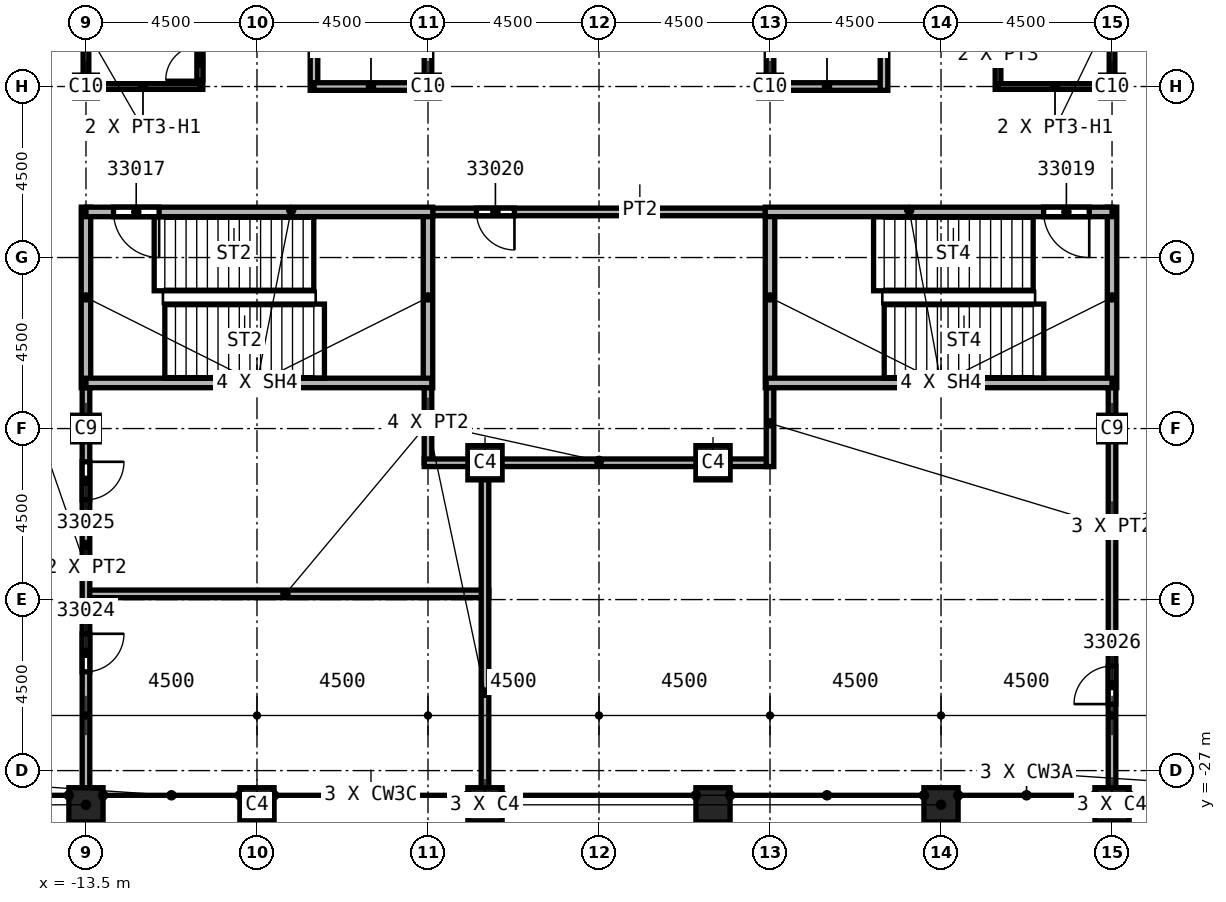
"""IFC4 building model, lengths in metres.
Left out: names, types, materials, properties, quantities, classifications, styles, units other than length and angle.
Written with IfcOpenShell. Run it as: python <this file> out.ifc"""

import sys

from ifc_helpers import new_model, si_unit, direction, frame, frame_2d, origin, origin_2d, place, context, subcontext, project, spatial, rectangle, extrude, element, fill, save


model = new_model("IFC4")
c1 = context("Model", 3, precision=1e-05, world=origin(), true_north=direction((0.0, 1.0)))
c2 = subcontext(c1, "Body", "Model", "MODEL_VIEW")
j1 = project(units=[si_unit("LENGTHUNIT", "METRE"), si_unit("PLANEANGLEUNIT", "RADIAN")], contexts=[c1])
p1 = place(None, origin())
s1 = spatial("IfcSite", under=j1, at=p1, CompositionType="ELEMENT")
p2 = place(p1, origin())
s2 = spatial("IfcBuilding", under=s1, at=p2, CompositionType="ELEMENT")
p3 = place(p2, frame((0.0, 0.0, 361.0)))
s3 = spatial("IfcBuildingStorey", under=s2, at=p3, CompositionType="ELEMENT", Elevation=361.0)
for number, where, z_axis, x_axis in (
    (1, (13.5, -18.0, 0.0), (0.0, 0.0, 1.0), (1.0, 0.0, 0.0)),
    (2, (-13.5, -18.0, 0.0), (0.0, 0.0, 1.0), (1.0, 0.0, 0.0)),
):
    element("IfcColumn", number, at=place(p3, frame(where, z_axis=z_axis, x_axis=x_axis)), inside=s3, PredefinedType="COLUMN", context=c2, shape_type="SweptSolid", body=[
        extrude(rectangle(XDim=0.7, YDim=0.7, at=origin_2d()), origin(), (0.0, 0.0, 1.0), 4.6),
    ])
for number, where, z_axis, x_axis in (
    (3, (4.5, -9.0, 0.0), (0.0, 0.0, 1.0), (1.0, 0.0, 0.0)),
    (4, (13.5, -9.0, 0.0), (0.0, 0.0, 1.0), (1.0, 0.0, 0.0)),
    (5, (-4.5, -9.0, 0.0), (0.0, 0.0, 1.0), (1.0, 0.0, 0.0)),
    (6, (-13.5, -9.0, 0.0), (0.0, 0.0, 1.0), (1.0, 0.0, 0.0)),
):
    element("IfcColumn", number, at=place(p3, frame(where, z_axis=z_axis, x_axis=x_axis)), inside=s3, PredefinedType="COLUMN", context=c2, shape_type="SweptSolid", body=[
        extrude(rectangle(XDim=0.6, YDim=0.6, at=origin_2d()), origin(), (0.0, 0.0, 1.0), 4.6),
    ])
for number, where, z_axis, x_axis in (
    (7, (3.0, -27.9, 0.0), (0.0, 0.0, 1.0), (1.0, 0.0, 0.0)),
    (8, (9.0, -27.9, 0.0), (0.0, 0.0, 1.0), (1.0, 0.0, 0.0)),
    (9, (13.5, -27.9, 0.0), (0.0, 0.0, 1.0), (1.0, 0.0, 0.0)),
    (10, (-3.0, -27.9, 0.0), (0.0, 0.0, 1.0), (1.0, 0.0, 0.0)),
    (11, (-9.0, -27.9, 0.0), (0.0, 0.0, 1.0), (1.0, 0.0, 0.0)),
    (12, (-13.5, -27.9, 0.0), (0.0, 0.0, 1.0), (1.0, 0.0, 0.0)),
    (13, (3.0, -18.9, 0.0), (0.0, 0.0, 1.0), (1.0, 0.0, 0.0)),
    (14, (-3.0, -18.9, 0.0), (0.0, 0.0, 1.0), (1.0, 0.0, 0.0)),
):
    element("IfcColumn", number, at=place(p3, frame(where, z_axis=z_axis, x_axis=x_axis)), inside=s3, PredefinedType="COLUMN", context=c2, shape_type="SweptSolid", body=[
        extrude(rectangle(XDim=0.9, YDim=0.9, at=origin_2d()), origin(), (0.0, 0.0, 1.0), 4.6),
    ])
p4 = place(p3, frame((-13.5, -22.35, 0.0), z_axis=(0.0, 0.0, 1.0), x_axis=(1.0, 0.0, 0.0)))
e15 = element("IfcWall", 15, at=p4, inside=s3, PredefinedType="PARTITIONING", context=c2, shape_type="SweptSolid", body=[
    extrude(rectangle(XDim=10.6, YDim=0.2, at=frame_2d((5.3, 0.0))), origin(), (0.0, 0.0, 1.0), 4.15),
])
p5 = place(p3, frame((-13.5, -16.675, 0.0), z_axis=(0.0, 0.0, 1.0), x_axis=(0.0, -1.0, 0.0)))
e16 = element("IfcWall", 16, at=p5, inside=s3, PredefinedType="PARTITIONING", context=c2, shape_type="SweptSolid", body=[
    extrude(rectangle(XDim=10.775, YDim=0.2, at=frame_2d((5.387, 0.0))), origin(), (0.0, 0.0, 1.0), 4.15),
])
p6 = place(p5, frame((6.725, 0.0, 0.0)))
e17 = element("IfcOpeningElement", 17, at=p6, cuts=e16, PredefinedType="OPENING", context=c2, shape_type="SweptSolid", body=[
    extrude(rectangle(XDim=1.0, YDim=2.1, at=frame_2d((0.5, 1.05))), frame((0.0, 0.1, 0.0), z_axis=(0.0, -1.0, 0.0), x_axis=(1.0, 0.0, 0.0)), (0.0, 0.0, 1.0), 0.2),
])
p7 = place(p5, frame((2.2, 0.0, 0.0)))
e18 = element("IfcOpeningElement", 18, at=p7, cuts=e16, PredefinedType="OPENING", context=c2, shape_type="SweptSolid", body=[
    extrude(rectangle(XDim=1.0, YDim=2.1, at=frame_2d((0.5, 1.05))), frame((0.0, 0.1, 0.0), z_axis=(0.0, -1.0, 0.0), x_axis=(1.0, 0.0, 0.0)), (0.0, 0.0, 1.0), 0.2),
])
p8 = place(p3, frame((-4.5, -18.9, 0.0), z_axis=(0.0, 0.0, 1.0), x_axis=(0.0, 1.0, 0.0)))
e19 = element("IfcWall", 19, at=p8, inside=s3, PredefinedType="PARTITIONING", context=c2, shape_type="SweptSolid", body=[
    extrude(rectangle(XDim=2.1, YDim=0.2, at=frame_2d((1.05, 0.0))), origin(), (0.0, 0.0, 1.0), 4.15),
])
p9 = place(p3, frame((-3.0, -18.9, 0.0), z_axis=(0.0, 0.0, 1.0), x_axis=(0.0, -1.0, 0.0)))
e20 = element("IfcWall", 20, at=p9, inside=s3, PredefinedType="PARTITIONING", context=c2, shape_type="SweptSolid", body=[
    extrude(rectangle(XDim=8.55, YDim=0.2, at=frame_2d((4.275, 0.0))), origin(), (0.0, 0.0, 1.0), 4.15),
])
p10 = place(p3, frame((4.5, -18.9, 0.0), z_axis=(0.0, 0.0, 1.0), x_axis=(-1.0, 0.0, 0.0)))
e21 = element("IfcWall", 21, at=p10, inside=s3, PredefinedType="PARTITIONING", context=c2, shape_type="SweptSolid", body=[
    extrude(rectangle(XDim=9.1, YDim=0.2, at=frame_2d((4.55, 0.0))), origin(), (0.0, 0.0, 1.0), 4.15),
])
p11 = place(p3, frame((4.5, -16.8, 0.0), z_axis=(0.0, 0.0, 1.0), x_axis=(0.0, -1.0, 0.0)))
e22 = element("IfcWall", 22, at=p11, inside=s3, PredefinedType="PARTITIONING", context=c2, shape_type="SweptSolid", body=[
    extrude(rectangle(XDim=2.2, YDim=0.2, at=frame_2d((1.1, 0.0))), origin(), (0.0, 0.0, 1.0), 4.15),
])
p12 = place(p3, frame((4.625, -12.3, 0.0), z_axis=(0.0, 0.0, 1.0), x_axis=(-1.0, 0.0, 0.0)))
e23 = element("IfcWall", 23, at=p12, inside=s3, PredefinedType="PARTITIONING", context=c2, shape_type="SweptSolid", body=[
    extrude(rectangle(XDim=9.25, YDim=0.2, at=frame_2d((4.625, 0.0))), origin(), (0.0, 0.0, 1.0), 4.15),
])
p13 = place(p12, frame((6.85, 0.0, 0.0)))
e24 = element("IfcOpeningElement", 24, at=p13, cuts=e23, PredefinedType="OPENING", context=c2, shape_type="SweptSolid", body=[
    extrude(rectangle(XDim=1.0, YDim=2.1, at=frame_2d((0.5, 1.05))), frame((0.0, 0.1, 0.0), z_axis=(0.0, -1.0, 0.0), x_axis=(1.0, 0.0, 0.0)), (0.0, 0.0, 1.0), 0.2),
])
p14 = place(p3, frame((13.5, -27.45, 0.0), z_axis=(0.0, 0.0, 1.0), x_axis=(0.0, 1.0, 0.0)))
e25 = element("IfcWall", 25, at=p14, inside=s3, PredefinedType="PARTITIONING", context=c2, shape_type="SweptSolid", body=[
    extrude(rectangle(XDim=10.775, YDim=0.2, at=frame_2d((5.387, 0.0))), origin(), (0.0, 0.0, 1.0), 4.15),
])
p15 = place(p14, frame((2.2, 0.0, 0.0)))
e26 = element("IfcOpeningElement", 26, at=p15, cuts=e25, PredefinedType="OPENING", context=c2, shape_type="SweptSolid", body=[
    extrude(rectangle(XDim=1.0, YDim=2.1, at=frame_2d((0.5, 1.05))), frame((0.0, 0.1, 0.0), z_axis=(0.0, -1.0, 0.0), x_axis=(1.0, 0.0, 0.0)), (0.0, 0.0, 1.0), 0.2),
])
p16 = place(p3, frame((-7.5, -9.1, 0.0), z_axis=(0.0, 0.0, 1.0), x_axis=(0.0, 1.0, 0.0)))
e27 = element("IfcWall", 27, at=p16, inside=s3, PredefinedType="SOLIDWALL", context=c2, shape_type="SweptSolid", body=[
    extrude(rectangle(XDim=6.225, YDim=0.2, at=frame_2d((3.113, 0.0))), origin(), (0.0, 0.0, 1.0), 4.15),
])
p17 = place(p3, frame((-4.5, -9.0, 0.0), z_axis=(0.0, 0.0, 1.0), x_axis=(-1.0, 0.0, 0.0)))
e28 = element("IfcWall", 28, at=p17, inside=s3, PredefinedType="SOLIDWALL", context=c2, shape_type="SweptSolid", body=[
    extrude(rectangle(XDim=3.0, YDim=0.2, at=frame_2d((1.5, 0.0))), origin(), (0.0, 0.0, 1.0), 3.838),
])
p18 = place(p3, frame((-4.5, 9.1, 0.0), z_axis=(0.0, 0.0, 1.0), x_axis=(0.0, -1.0, 0.0)))
e29 = element("IfcWall", 29, at=p18, inside=s3, PredefinedType="SOLIDWALL", context=c2, shape_type="SweptSolid", body=[
    extrude(rectangle(XDim=18.2, YDim=0.2, at=frame_2d((9.1, 0.0))), origin(), (0.0, 0.0, 1.0), 3.838),
])
p19 = place(p18, frame((9.95, 0.0, 0.0)))
e30 = element("IfcOpeningElement", 30, at=p19, cuts=e29, PredefinedType="OPENING", context=c2, shape_type="SweptSolid", body=[
    extrude(rectangle(XDim=1.1, YDim=2.1, at=frame_2d((0.55, 1.05))), frame((0.0, 0.1, 0.0), z_axis=(0.0, -1.0, 0.0), x_axis=(1.0, 0.0, 0.0)), (0.0, 0.0, 1.0), 0.2),
])
p20 = place(p18, frame((4.75, 0.0, 0.0)))
e31 = element("IfcOpeningElement", 31, at=p20, cuts=e29, PredefinedType="OPENING", context=c2, shape_type="SweptSolid", body=[
    extrude(rectangle(XDim=1.1, YDim=2.1, at=frame_2d((0.55, 1.05))), frame((0.0, 0.1, 0.0), z_axis=(0.0, -1.0, 0.0), x_axis=(1.0, 0.0, 0.0)), (0.0, 0.0, 1.0), 0.2),
])
p21 = place(p3, frame((4.5, -9.1, 0.0), z_axis=(0.0, 0.0, 1.0), x_axis=(0.0, 1.0, 0.0)))
e32 = element("IfcWall", 32, at=p21, inside=s3, PredefinedType="SOLIDWALL", context=c2, shape_type="SweptSolid", body=[
    extrude(rectangle(XDim=18.2, YDim=0.2, at=frame_2d((9.1, 0.0))), origin(), (0.0, 0.0, 1.0), 3.838),
])
p22 = place(p21, frame((5.5, 0.0, 0.0)))
e33 = element("IfcOpeningElement", 33, at=p22, cuts=e32, PredefinedType="OPENING", context=c2, shape_type="SweptSolid", body=[
    extrude(rectangle(XDim=1.1, YDim=2.1, at=frame_2d((0.55, 1.05))), frame((0.0, 0.1, 0.0), z_axis=(0.0, -1.0, 0.0), x_axis=(1.0, 0.0, 0.0)), (0.0, 0.0, 1.0), 0.2),
])
p23 = place(p21, frame((13.7, 0.0, 0.0)))
e34 = element("IfcOpeningElement", 34, at=p23, cuts=e32, PredefinedType="OPENING", context=c2, shape_type="SweptSolid", body=[
    extrude(rectangle(XDim=1.1, YDim=2.1, at=frame_2d((0.55, 1.05))), frame((0.0, 0.1, 0.0), z_axis=(0.0, -1.0, 0.0), x_axis=(1.0, 0.0, 0.0)), (0.0, 0.0, 1.0), 0.2),
])
p24 = place(p3, frame((7.5, -9.0, 0.0), z_axis=(0.0, 0.0, 1.0), x_axis=(-1.0, 0.0, 0.0)))
e35 = element("IfcWall", 35, at=p24, inside=s3, PredefinedType="SOLIDWALL", context=c2, shape_type="SweptSolid", body=[
    extrude(rectangle(XDim=3.0, YDim=0.2, at=frame_2d((1.5, 0.0))), origin(), (0.0, 0.0, 1.0), 3.838),
])
p25 = place(p3, frame((7.5, -2.875, 0.0), z_axis=(0.0, 0.0, 1.0), x_axis=(0.0, -1.0, 0.0)))
e36 = element("IfcWall", 36, at=p25, inside=s3, PredefinedType="SOLIDWALL", context=c2, shape_type="SweptSolid", body=[
    extrude(rectangle(XDim=6.225, YDim=0.2, at=frame_2d((3.113, 0.0))), origin(), (0.0, 0.0, 1.0), 4.15),
])
p26 = place(p3, frame((-13.5, -12.175, 0.0), z_axis=(0.0, 0.0, 1.0), x_axis=(0.0, -1.0, 0.0)))
e37 = element("IfcWall", 37, at=p26, inside=s3, PredefinedType="SOLIDWALL", context=c2, shape_type="SweptSolid", body=[
    extrude(rectangle(XDim=4.75, YDim=0.25, at=frame_2d((2.375, 0.0))), origin(), (0.0, 0.0, 1.0), 4.15),
])
p27 = place(p3, frame((-4.5, -12.3, 0.0), z_axis=(0.0, 0.0, 1.0), x_axis=(0.0, -1.0, 0.0)))
e38 = element("IfcWall", 38, at=p27, inside=s3, PredefinedType="SOLIDWALL", context=c2, shape_type="SweptSolid", body=[
    extrude(rectangle(XDim=4.625, YDim=0.25, at=frame_2d((2.312, 0.0))), origin(), (0.0, 0.0, 1.0), 4.15),
])
p28 = place(p3, frame((-4.4, -16.8, 0.0), z_axis=(0.0, 0.0, 1.0), x_axis=(-1.0, 0.0, 0.0)))
e39 = element("IfcWall", 39, at=p28, inside=s3, PredefinedType="SOLIDWALL", context=c2, shape_type="SweptSolid", body=[
    extrude(rectangle(XDim=9.1, YDim=0.25, at=frame_2d((4.55, 0.0))), origin(), (0.0, 0.0, 1.0), 4.15),
])
p29 = place(p3, frame((-4.375, -12.3, 0.0), z_axis=(0.0, 0.0, 1.0), x_axis=(-1.0, 0.0, 0.0)))
e40 = element("IfcWall", 40, at=p29, inside=s3, PredefinedType="SOLIDWALL", context=c2, shape_type="SweptSolid", body=[
    extrude(rectangle(XDim=9.125, YDim=0.25, at=frame_2d((4.562, 0.0))), origin(), (0.0, 0.0, 1.0), 4.15),
])
p30 = place(p29, frame((7.2, 0.0, 0.0)))
e41 = element("IfcOpeningElement", 41, at=p30, cuts=e40, PredefinedType="OPENING", context=c2, shape_type="SweptSolid", body=[
    extrude(rectangle(XDim=1.2, YDim=2.1, at=frame_2d((0.6, 1.05))), frame((0.0, 0.125, 0.0), z_axis=(0.0, -1.0, 0.0), x_axis=(1.0, 0.0, 0.0)), (0.0, 0.0, 1.0), 0.25),
])
p31 = place(p3, frame((4.5, -16.925, 0.0), z_axis=(0.0, 0.0, 1.0), x_axis=(0.0, 1.0, 0.0)))
e42 = element("IfcWall", 42, at=p31, inside=s3, PredefinedType="SOLIDWALL", context=c2, shape_type="SweptSolid", body=[
    extrude(rectangle(XDim=4.625, YDim=0.25, at=frame_2d((2.312, 0.0))), origin(), (0.0, 0.0, 1.0), 4.15),
])
p32 = place(p3, frame((13.5, -16.925, 0.0), z_axis=(0.0, 0.0, 1.0), x_axis=(0.0, 1.0, 0.0)))
e43 = element("IfcWall", 43, at=p32, inside=s3, PredefinedType="SOLIDWALL", context=c2, shape_type="SweptSolid", body=[
    extrude(rectangle(XDim=4.75, YDim=0.25, at=frame_2d((2.375, 0.0))), origin(), (0.0, 0.0, 1.0), 4.15),
])
p33 = place(p3, frame((13.5, -16.8, 0.0), z_axis=(0.0, 0.0, 1.0), x_axis=(-1.0, 0.0, 0.0)))
e44 = element("IfcWall", 44, at=p33, inside=s3, PredefinedType="SOLIDWALL", context=c2, shape_type="SweptSolid", body=[
    extrude(rectangle(XDim=9.1, YDim=0.25, at=frame_2d((4.55, 0.0))), origin(), (0.0, 0.0, 1.0), 4.15),
])
p34 = place(p3, frame((13.5, -12.3, 0.0), z_axis=(0.0, 0.0, 1.0), x_axis=(-1.0, 0.0, 0.0)))
e45 = element("IfcWall", 45, at=p34, inside=s3, PredefinedType="SOLIDWALL", context=c2, shape_type="SweptSolid", body=[
    extrude(rectangle(XDim=9.125, YDim=0.25, at=frame_2d((4.562, 0.0))), origin(), (0.0, 0.0, 1.0), 4.15),
])
p35 = place(p34, frame((0.6, 0.0, 0.0)))
e46 = element("IfcOpeningElement", 46, at=p35, cuts=e45, PredefinedType="OPENING", context=c2, shape_type="SweptSolid", body=[
    extrude(rectangle(XDim=1.2, YDim=2.1, at=frame_2d((0.6, 1.05))), frame((0.0, 0.125, 0.0), z_axis=(0.0, -1.0, 0.0), x_axis=(1.0, 0.0, 0.0)), (0.0, 0.0, 1.0), 0.25),
])
p36 = place(p3, frame((-13.5, -9.075, 0.0), z_axis=(0.0, 0.0, 1.0), x_axis=(0.0, 1.0, 0.0)))
e47 = element("IfcWall", 47, at=p36, inside=s3, PredefinedType="PARTITIONING", context=c2, shape_type="SweptSolid", body=[
    extrude(rectangle(XDim=3.075, YDim=0.15, at=frame_2d((1.538, 0.0))), origin(), (0.0, 0.0, 1.0), 3.838),
])
p37 = place(p3, frame((-10.5, -9.075, 0.0), z_axis=(0.0, 0.0, 1.0), x_axis=(0.0, 1.0, 0.0)))
e48 = element("IfcWall", 48, at=p37, inside=s3, PredefinedType="PARTITIONING", context=c2, shape_type="SweptSolid", body=[
    extrude(rectangle(XDim=3.15, YDim=0.15, at=frame_2d((1.575, 0.0))), origin(), (0.0, 0.0, 1.0), 4.15),
])
p38 = place(p37, frame((0.25, 0.0, 0.0)))
e49 = element("IfcOpeningElement", 49, at=p38, cuts=e48, PredefinedType="OPENING", context=c2, shape_type="SweptSolid", body=[
    extrude(rectangle(XDim=0.9, YDim=2.1, at=frame_2d((0.45, 1.05))), frame((0.0, 0.075, 0.0), z_axis=(0.0, -1.0, 0.0), x_axis=(1.0, 0.0, 0.0)), (0.0, 0.0, 1.0), 0.15),
])
p39 = place(p3, frame((-10.5, -9.0, 0.0), z_axis=(0.0, 0.0, 1.0), x_axis=(-1.0, 0.0, 0.0)))
e50 = element("IfcWall", 50, at=p39, inside=s3, PredefinedType="PARTITIONING", context=c2, shape_type="SweptSolid", body=[
    extrude(rectangle(XDim=3.0, YDim=0.15, at=frame_2d((1.5, 0.0))), origin(), (0.0, 0.0, 1.0), 3.838),
])
p40 = place(p3, frame((10.5, -4.925, 0.0), z_axis=(0.0, 0.0, 1.0), x_axis=(0.0, -1.0, 0.0)))
e51 = element("IfcWall", 51, at=p40, inside=s3, PredefinedType="PARTITIONING", context=c2, shape_type="SweptSolid", body=[
    extrude(rectangle(XDim=4.15, YDim=0.15, at=frame_2d((2.075, 0.0))), origin(), (0.0, 0.0, 1.0), 4.15),
])
p41 = place(p40, frame((1.6, 0.0, 0.0)))
e52 = element("IfcOpeningElement", 52, at=p41, cuts=e51, PredefinedType="OPENING", context=c2, shape_type="SweptSolid", body=[
    extrude(rectangle(XDim=0.9, YDim=2.1, at=frame_2d((0.45, 1.05))), frame((0.0, 0.075, 0.0), z_axis=(0.0, -1.0, 0.0), x_axis=(1.0, 0.0, 0.0)), (0.0, 0.0, 1.0), 0.15),
])
p42 = place(p3, frame((13.5, -9.0, 0.0), z_axis=(0.0, 0.0, 1.0), x_axis=(-1.0, 0.0, 0.0)))
e53 = element("IfcWall", 53, at=p42, inside=s3, PredefinedType="PARTITIONING", context=c2, shape_type="SweptSolid", body=[
    extrude(rectangle(XDim=3.0, YDim=0.15, at=frame_2d((1.5, 0.0))), origin(), (0.0, 0.0, 1.0), 3.838),
])
p43 = place(p3, frame((13.5, -5.0, 0.0), z_axis=(0.0, 0.0, 1.0), x_axis=(0.0, -1.0, 0.0)))
e54 = element("IfcWall", 54, at=p43, inside=s3, PredefinedType="PARTITIONING", context=c2, shape_type="SweptSolid", body=[
    extrude(rectangle(XDim=4.075, YDim=0.15, at=frame_2d((2.038, 0.0))), origin(), (0.0, 0.0, 1.0), 3.838),
])
p44 = place(p38, origin())
e55 = element("IfcDoor", 55, at=p44, inside=s3, OperationType="SINGLE_SWING_RIGHT", PredefinedType="DOOR", context=c2, shape_type="SweptSolid", body=[
    extrude(rectangle(XDim=0.9, YDim=2.1, at=frame_2d((0.45, 1.05))), frame((0.0, 0.025, 0.0), z_axis=(0.0, -1.0, 0.0), x_axis=(1.0, 0.0, 0.0)), (0.0, 0.0, 1.0), 0.05),
])
fill(e49, e55)
p45 = place(p30, origin())
e56 = element("IfcDoor", 56, at=p45, inside=s3, OperationType="SINGLE_SWING_RIGHT", PredefinedType="DOOR", context=c2, shape_type="SweptSolid", body=[
    extrude(rectangle(XDim=1.2, YDim=2.1, at=frame_2d((0.6, 1.05))), frame((0.0, 0.025, 0.0), z_axis=(0.0, -1.0, 0.0), x_axis=(1.0, 0.0, 0.0)), (0.0, 0.0, 1.0), 0.05),
])
fill(e41, e56)
p46 = place(p35, origin())
e57 = element("IfcDoor", 57, at=p46, inside=s3, OperationType="SINGLE_SWING_RIGHT", PredefinedType="DOOR", context=c2, shape_type="SweptSolid", body=[
    extrude(rectangle(XDim=1.2, YDim=2.1, at=frame_2d((0.6, 1.05))), frame((0.0, 0.025, 0.0), z_axis=(0.0, -1.0, 0.0), x_axis=(1.0, 0.0, 0.0)), (0.0, 0.0, 1.0), 0.05),
])
fill(e46, e57)
p47 = place(p13, origin())
e58 = element("IfcDoor", 58, at=p47, inside=s3, OperationType="SINGLE_SWING_LEFT", PredefinedType="DOOR", context=c2, shape_type="SweptSolid", body=[
    extrude(rectangle(XDim=1.0, YDim=2.1, at=frame_2d((0.5, 1.05))), frame((0.0, 0.025, 0.0), z_axis=(0.0, -1.0, 0.0), x_axis=(1.0, 0.0, 0.0)), (0.0, 0.0, 1.0), 0.05),
])
fill(e24, e58)
p48 = place(p6, origin())
e59 = element("IfcDoor", 59, at=p48, inside=s3, OperationType="SINGLE_SWING_LEFT", PredefinedType="DOOR", context=c2, shape_type="SweptSolid", body=[
    extrude(rectangle(XDim=1.0, YDim=2.1, at=frame_2d((0.5, 1.05))), frame((0.0, 0.025, 0.0), z_axis=(0.0, -1.0, 0.0), x_axis=(1.0, 0.0, 0.0)), (0.0, 0.0, 1.0), 0.05),
])
fill(e17, e59)
p49 = place(p7, origin())
e60 = element("IfcDoor", 60, at=p49, inside=s3, OperationType="SINGLE_SWING_RIGHT", PredefinedType="DOOR", context=c2, shape_type="SweptSolid", body=[
    extrude(rectangle(XDim=1.0, YDim=2.1, at=frame_2d((0.5, 1.05))), frame((0.0, 0.025, 0.0), z_axis=(0.0, -1.0, 0.0), x_axis=(1.0, 0.0, 0.0)), (0.0, 0.0, 1.0), 0.05),
])
fill(e18, e60)
p50 = place(p15, origin())
e61 = element("IfcDoor", 61, at=p50, inside=s3, OperationType="SINGLE_SWING_LEFT", PredefinedType="DOOR", context=c2, shape_type="SweptSolid", body=[
    extrude(rectangle(XDim=1.0, YDim=2.1, at=frame_2d((0.5, 1.05))), frame((0.0, 0.025, 0.0), z_axis=(0.0, -1.0, 0.0), x_axis=(1.0, 0.0, 0.0)), (0.0, 0.0, 1.0), 0.05),
])
fill(e26, e61)
save(model, sys.argv[1])
